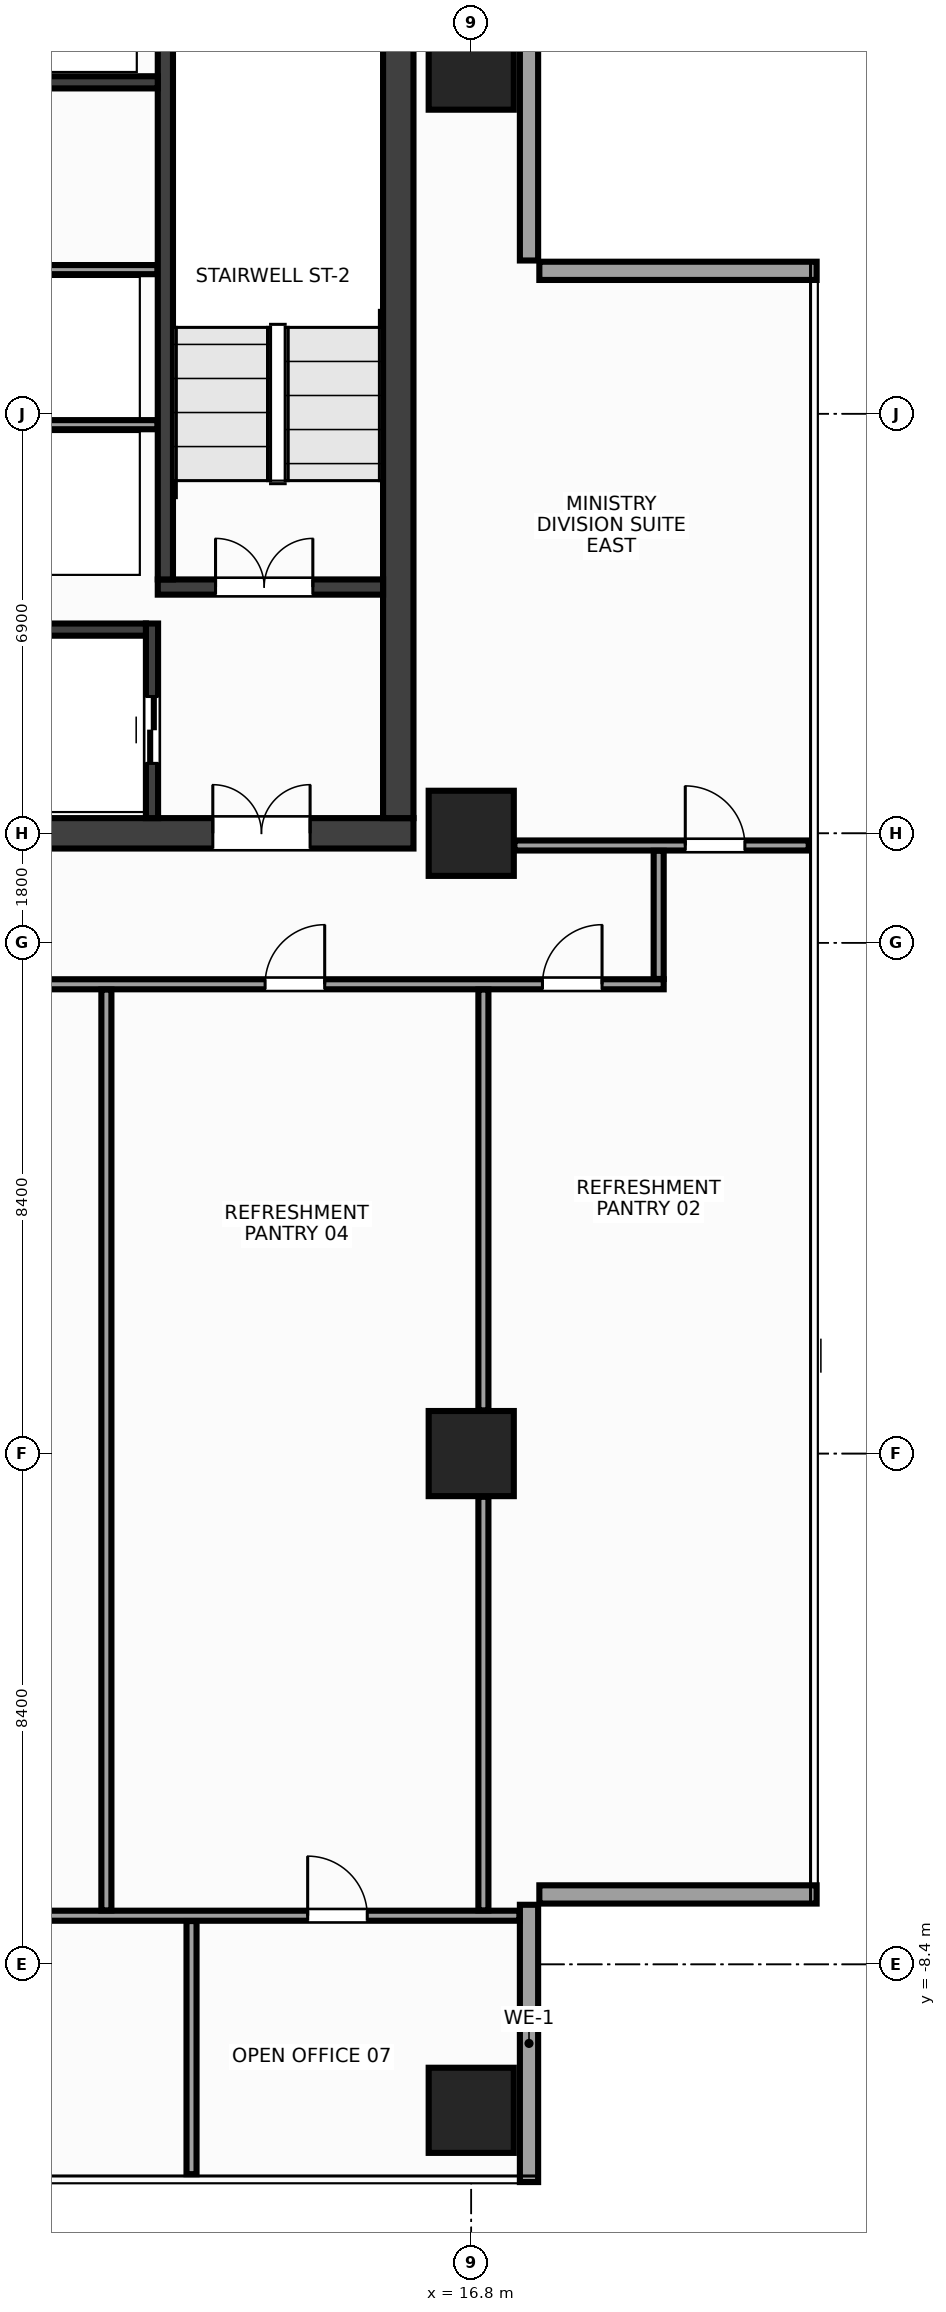
"""IFC4 building model, lengths in metres.
Left out: names, types, materials, properties, quantities, classifications, styles, units other than length and angle.
Written with IfcOpenShell. Run it as: python <this file> out.ifc"""

import sys

from ifc_helpers import new_model, si_unit, direction, frame, frame_2d, origin, origin_2d, place, context, subcontext, project, spatial, rectangle, extrude, source, transform, mapped, element, fill, save


model = new_model("IFC4")
c1 = context("Model", 3, precision=1e-05, world=origin(), true_north=direction((0.0, 1.0)))
c2 = subcontext(c1, "Body", "Model", "MODEL_VIEW")
j1 = project(units=[si_unit("LENGTHUNIT", "METRE"), si_unit("PLANEANGLEUNIT", "RADIAN")], contexts=[c1])
p1 = place(None, origin())
s1 = spatial("IfcSite", under=j1, at=p1, CompositionType="ELEMENT")
p2 = place(p1, origin())
s2 = spatial("IfcBuilding", under=s1, at=p2, CompositionType="ELEMENT")
p3 = place(p2, frame((0.0, 0.0, 257.6)))
s3 = spatial("IfcBuildingStorey", under=s2, at=p3, CompositionType="ELEMENT", Elevation=257.6)
m1 = source(origin(), c2, "Body", "SweptSolid", [
    extrude(rectangle(XDim=31.7, YDim=0.5, at=frame_2d((15.85, 0.0))), origin(), (0.0, 0.0, 1.0), 3.6),
])
p4 = place(p3, frame((-15.85, 10.2, 0.0), z_axis=(0.0, 0.0, 1.0), x_axis=(1.0, 0.0, 0.0)))
e1 = element("IfcWall", 1, at=p4, inside=s3, PredefinedType="SHEAR", context=c2, shape_type="MappedRepresentation", body=[
    mapped(m1, transform((0.0, 0.0, 0.0), x_axis=(1.0, 0.0, 0.0), y_axis=(0.0, 1.0, 0.0), z_axis=(0.0, 0.0, 1.0), scale=1.0)),
])
p5 = place(p4, frame((1.7, 0.0, 0.0)))
e2 = element("IfcOpeningElement", 2, at=p5, cuts=e1, PredefinedType="OPENING", context=c2, shape_type="SweptSolid", body=[
    extrude(rectangle(XDim=1.6, YDim=2.15, at=frame_2d((0.8, 1.075))), frame((0.0, 0.262, 0.0), z_axis=(0.0, -1.0, 0.0), x_axis=(1.0, 0.0, 0.0)), (0.0, 0.0, 1.0), 0.524),
])
p6 = place(p4, frame((28.4, 0.0, 0.0)))
e3 = element("IfcOpeningElement", 3, at=p6, cuts=e1, PredefinedType="OPENING", context=c2, shape_type="SweptSolid", body=[
    extrude(rectangle(XDim=1.6, YDim=2.15, at=frame_2d((0.8, 1.075))), frame((0.0, 0.262, 0.0), z_axis=(0.0, -1.0, 0.0), x_axis=(1.0, 0.0, 0.0)), (0.0, 0.0, 1.0), 0.524),
])
p7 = place(p4, frame((15.1, 0.0, 0.0)))
e4 = element("IfcOpeningElement", 4, at=p7, cuts=e1, PredefinedType="OPENING", context=c2, shape_type="SweptSolid", body=[
    extrude(rectangle(XDim=1.5, YDim=2.2, at=frame_2d((0.75, 1.1))), frame((0.0, 0.262, 0.0), z_axis=(0.0, -1.0, 0.0), x_axis=(1.0, 0.0, 0.0)), (0.0, 0.0, 1.0), 0.524),
])
m2 = source(origin(), c2, "Body", "SweptSolid", [
    extrude(rectangle(XDim=13.1, YDim=0.5, at=frame_2d((6.55, 0.0))), origin(), (0.0, 0.0, 1.0), 3.6),
])
p8 = place(p3, frame((15.6, 10.45, 0.0), z_axis=(0.0, 0.0, 1.0), x_axis=(0.0, 1.0, 0.0)))
e5 = element("IfcWall", 5, at=p8, inside=s3, PredefinedType="SHEAR", context=c2, shape_type="MappedRepresentation", body=[
    mapped(m2, transform((0.0, 0.0, 0.0), x_axis=(1.0, 0.0, 0.0), y_axis=(0.0, 1.0, 0.0), z_axis=(0.0, 0.0, 1.0), scale=1.0)),
])
m3 = source(origin(), c2, "Body", "SweptSolid", [
    extrude(rectangle(XDim=3.705, YDim=0.25, at=frame_2d((1.853, 0.0))), origin(), (0.0, 0.0, 1.0), 3.6),
])
p9 = place(p3, frame((11.645, 14.25, 0.0), z_axis=(0.0, 0.0, 1.0), x_axis=(1.0, 0.0, 0.0)))
e6 = element("IfcWall", 6, at=p9, inside=s3, PredefinedType="SHEAR", context=c2, shape_type="MappedRepresentation", body=[
    mapped(m3, transform((0.0, 0.0, 0.0), x_axis=(1.0, 0.0, 0.0), y_axis=(0.0, 1.0, 0.0), z_axis=(0.0, 0.0, 1.0), scale=1.0)),
])
p10 = place(p9, frame((0.95, 0.0, 0.0)))
e7 = element("IfcOpeningElement", 7, at=p10, cuts=e6, PredefinedType="OPENING", context=c2, shape_type="SweptSolid", body=[
    extrude(rectangle(XDim=1.6, YDim=2.15, at=frame_2d((0.8, 1.075))), frame((0.0, 0.137, 0.0), z_axis=(0.0, -1.0, 0.0), x_axis=(1.0, 0.0, 0.0)), (0.0, 0.0, 1.0), 0.274),
])
m4 = source(origin(), c2, "Body", "SweptSolid", [
    extrude(rectangle(XDim=9.175, YDim=0.25, at=frame_2d((4.587, 0.0))), origin(), (0.0, 0.0, 1.0), 3.6),
])
p11 = place(p3, frame((11.77, 14.375, 0.0), z_axis=(0.0, 0.0, 1.0), x_axis=(0.0, 1.0, 0.0)))
e8 = element("IfcWall", 8, at=p11, inside=s3, PredefinedType="SHEAR", context=c2, shape_type="MappedRepresentation", body=[
    mapped(m4, transform((0.0, 0.0, 0.0), x_axis=(1.0, 0.0, 0.0), y_axis=(0.0, 1.0, 0.0), z_axis=(0.0, 0.0, 1.0), scale=1.0)),
])
m5 = source(origin(), c2, "Body", "SweptSolid", [
    extrude(rectangle(XDim=3.2, YDim=0.2, at=frame_2d((1.6, 0.0))), origin(), (0.0, 0.0, 1.0), 3.6),
])
p12 = place(p3, frame((11.55, 10.45, 0.0), z_axis=(0.0, 0.0, 1.0), x_axis=(0.0, 1.0, 0.0)))
e9 = element("IfcWall", 9, at=p12, inside=s3, PredefinedType="SHEAR", context=c2, shape_type="MappedRepresentation", body=[
    mapped(m5, transform((0.0, 0.0, 0.0), x_axis=(1.0, 0.0, 0.0), y_axis=(0.0, 1.0, 0.0), z_axis=(0.0, 0.0, 1.0), scale=1.0)),
])
p13 = place(p12, frame((0.9, 0.0, 0.0)))
e10 = element("IfcOpeningElement", 10, at=p13, cuts=e9, PredefinedType="OPENING", context=c2, shape_type="SweptSolid", body=[
    extrude(rectangle(XDim=1.1, YDim=2.15, at=frame_2d((0.55, 1.075))), frame((0.0, 0.112, 0.0), z_axis=(0.0, -1.0, 0.0), x_axis=(1.0, 0.0, 0.0)), (0.0, 0.0, 1.0), 0.224),
])
m6 = source(origin(), c2, "Body", "SweptSolid", [
    extrude(rectangle(XDim=2.825, YDim=0.2, at=frame_2d((1.413, 0.0))), origin(), (0.0, 0.0, 1.0), 3.6),
])
p14 = place(p3, frame((8.625, 13.55, 0.0), z_axis=(0.0, 0.0, 1.0), x_axis=(1.0, 0.0, 0.0)))
e11 = element("IfcWall", 11, at=p14, inside=s3, PredefinedType="SHEAR", context=c2, shape_type="MappedRepresentation", body=[
    mapped(m6, transform((0.0, 0.0, 0.0), x_axis=(1.0, 0.0, 0.0), y_axis=(0.0, 1.0, 0.0), z_axis=(0.0, 0.0, 1.0), scale=1.0)),
])
m7 = source(origin(), c2, "Body", "SweptSolid", [
    extrude(rectangle(XDim=3.02, YDim=0.2, at=frame_2d((1.51, 0.0))), origin(), (0.0, 0.0, 1.0), 3.6),
])
p15 = place(p3, frame((8.625, 22.55, 0.0), z_axis=(0.0, 0.0, 1.0), x_axis=(1.0, 0.0, 0.0)))
e12 = element("IfcWall", 12, at=p15, inside=s3, PredefinedType="SHEAR", context=c2, shape_type="MappedRepresentation", body=[
    mapped(m7, transform((0.0, 0.0, 0.0), x_axis=(1.0, 0.0, 0.0), y_axis=(0.0, 1.0, 0.0), z_axis=(0.0, 0.0, 1.0), scale=1.0)),
])
m8 = source(origin(), c2, "Body", "SweptSolid", [
    extrude(rectangle(XDim=1.4, YDim=1.4, at=origin_2d()), origin(), (0.0, 0.0, 1.0), 3.6),
])
for number, where, z_axis, x_axis in (
    (13, (16.8, -10.8, 0.0), (0.0, 0.0, 1.0), (1.0, 0.0, 0.0)),
    (14, (16.8, 0.0, 0.0), (0.0, 0.0, 1.0), (1.0, 0.0, 0.0)),
    (15, (16.8, 10.2, 0.0), (0.0, 0.0, 1.0), (1.0, 0.0, 0.0)),
    (16, (16.8, 22.8, 0.0), (0.0, 0.0, 1.0), (1.0, 0.0, 0.0)),
):
    element("IfcColumn", number, at=place(p3, frame(where, z_axis=z_axis, x_axis=x_axis)), inside=s3, PredefinedType="COLUMN", context=c2, shape_type="MappedRepresentation", body=[
        mapped(m8, transform((0.0, 0.0, 0.0), x_axis=(1.0, 0.0, 0.0), y_axis=(0.0, 1.0, 0.0), z_axis=(0.0, 0.0, 1.0), scale=1.0)),
    ])
m9 = source(origin(), c2, "Body", "SweptSolid", [
    extrude(rectangle(XDim=4.56, YDim=0.3, at=frame_2d((2.28, 0.0))), origin(), (0.0, 0.0, 1.0), 2.75),
])
for number, where, z_axis, x_axis in (
    (17, (17.75, -11.98, 0.0), (0.0, 0.0, 1.0), (0.0, 1.0, 0.0)),
    (18, (17.92, -7.25, 0.0), (0.0, 0.0, 1.0), (1.0, 0.0, 0.0)),
    (19, (22.48, 19.45, 0.0), (0.0, 0.0, 1.0), (-1.0, 0.0, 0.0)),
):
    element("IfcWall", number, at=place(p3, frame(where, z_axis=z_axis, x_axis=x_axis)), inside=s3, PredefinedType="STANDARD", context=c2, shape_type="MappedRepresentation", body=[
        mapped(m9, transform((0.0, 0.0, 0.0), x_axis=(1.0, 0.0, 0.0), y_axis=(0.0, 1.0, 0.0), z_axis=(0.0, 0.0, 1.0), scale=1.0)),
    ])
m10 = source(origin(), c2, "Body", "SweptSolid", [
    extrude(rectangle(XDim=4.56, YDim=0.3, at=frame_2d((2.28, 0.0))), origin(), (0.0, 0.0, 1.0), 2.75),
])
p16 = place(p3, frame((17.75, 19.62, 0.0), z_axis=(0.0, 0.0, 1.0), x_axis=(0.0, 1.0, 0.0)))
e20 = element("IfcWall", 20, at=p16, inside=s3, PredefinedType="STANDARD", context=c2, shape_type="MappedRepresentation", body=[
    mapped(m10, transform((0.0, 0.0, 0.0), x_axis=(1.0, 0.0, 0.0), y_axis=(0.0, 1.0, 0.0), z_axis=(0.0, 0.0, 1.0), scale=1.0)),
])
m11 = source(origin(), c2, "Body", "SweptSolid", [
    extrude(rectangle(XDim=3.01, YDim=0.15, at=frame_2d((1.505, 0.0))), origin(), (0.0, 0.0, 1.0), 3.37),
])
for number, where, z_axis, x_axis in (
    (21, (8.63, 16.92, 0.0), (0.0, 0.0, 1.0), (1.0, 0.0, 0.0)),
    (22, (8.63, 19.47, 0.0), (0.0, 0.0, 1.0), (1.0, 0.0, 0.0)),
):
    element("IfcWall", number, at=place(p3, frame(where, z_axis=z_axis, x_axis=x_axis)), inside=s3, PredefinedType="PARTITIONING", context=c2, shape_type="MappedRepresentation", body=[
        mapped(m11, transform((0.0, 0.0, 0.0), x_axis=(1.0, 0.0, 0.0), y_axis=(0.0, 1.0, 0.0), z_axis=(0.0, 0.0, 1.0), scale=1.0)),
    ])
m12 = source(origin(), c2, "Body", "SweptSolid", [
    extrude(rectangle(XDim=4.84, YDim=0.165, at=frame_2d((2.42, 0.0))), origin(), (0.0, 0.0, 1.0), 3.37),
])
p17 = place(p3, frame((17.51, 10.0, 0.0), z_axis=(0.0, 0.0, 1.0), x_axis=(1.0, 0.0, 0.0)))
e23 = element("IfcWall", 23, at=p17, inside=s3, PredefinedType="PARTITIONING", context=c2, shape_type="MappedRepresentation", body=[
    mapped(m12, transform((0.0, 0.0, 0.0), x_axis=(1.0, 0.0, 0.0), y_axis=(0.0, 1.0, 0.0), z_axis=(0.0, 0.0, 1.0), scale=1.0)),
])
p18 = place(p17, frame((2.81, 0.0, 0.0)))
e24 = element("IfcOpeningElement", 24, at=p18, cuts=e23, PredefinedType="OPENING", context=c2, shape_type="SweptSolid", body=[
    extrude(rectangle(XDim=0.98, YDim=2.15, at=frame_2d((0.49, 1.075))), frame((0.0, 0.094, 0.0), z_axis=(0.0, -1.0, 0.0), x_axis=(1.0, 0.0, 0.0)), (0.0, 0.0, 1.0), 0.189),
])
m13 = source(origin(), c2, "Body", "SweptSolid", [
    extrude(rectangle(XDim=21.9, YDim=0.165, at=frame_2d((10.95, 0.0))), origin(), (0.0, 0.0, 1.0), 2.755),
])
p19 = place(p3, frame((-1.935, 7.718, 0.0), z_axis=(0.0, 0.0, 1.0), x_axis=(1.0, 0.0, 0.0)))
e25 = element("IfcWall", 25, at=p19, inside=s3, PredefinedType="PARTITIONING", context=c2, shape_type="MappedRepresentation", body=[
    mapped(m13, transform((0.0, 0.0, 0.0), x_axis=(1.0, 0.0, 0.0), y_axis=(0.0, 1.0, 0.0), z_axis=(0.0, 0.0, 1.0), scale=1.0)),
])
p20 = place(p19, frame((19.906, 0.0, 0.0)))
e26 = element("IfcOpeningElement", 26, at=p20, cuts=e25, PredefinedType="OPENING", context=c2, shape_type="SweptSolid", body=[
    extrude(rectangle(XDim=0.98, YDim=2.15, at=frame_2d((0.49, 1.075))), frame((0.0, 0.094, 0.0), z_axis=(0.0, -1.0, 0.0), x_axis=(1.0, 0.0, 0.0)), (0.0, 0.0, 1.0), 0.189),
])
p21 = place(p19, frame((15.345, 0.0, 0.0)))
e27 = element("IfcOpeningElement", 27, at=p21, cuts=e25, PredefinedType="OPENING", context=c2, shape_type="SweptSolid", body=[
    extrude(rectangle(XDim=0.98, YDim=2.15, at=frame_2d((0.49, 1.075))), frame((0.0, 0.094, 0.0), z_axis=(0.0, -1.0, 0.0), x_axis=(1.0, 0.0, 0.0)), (0.0, 0.0, 1.0), 0.189),
])
m14 = source(origin(), c2, "Body", "SweptSolid", [
    extrude(rectangle(XDim=2.108, YDim=0.165, at=frame_2d((1.054, 0.0))), origin(), (0.0, 0.0, 1.0), 3.37),
])
p22 = place(p3, frame((19.883, 7.805, 0.0), z_axis=(0.0, 0.0, 1.0), x_axis=(0.0, 1.0, 0.0)))
e28 = element("IfcWall", 28, at=p22, inside=s3, PredefinedType="PARTITIONING", context=c2, shape_type="MappedRepresentation", body=[
    mapped(m14, transform((0.0, 0.0, 0.0), x_axis=(1.0, 0.0, 0.0), y_axis=(0.0, 1.0, 0.0), z_axis=(0.0, 0.0, 1.0), scale=1.0)),
])
m15 = source(origin(), c2, "Body", "SweptSolid", [
    extrude(rectangle(XDim=35.184, YDim=0.165, at=frame_2d((17.592, 0.0))), origin(), (0.0, 0.0, 1.0), 2.755),
])
p23 = place(p3, frame((-17.592, -7.6, 0.0), z_axis=(0.0, 0.0, 1.0), x_axis=(1.0, 0.0, 0.0)))
e29 = element("IfcWall", 29, at=p23, inside=s3, PredefinedType="PARTITIONING", context=c2, shape_type="MappedRepresentation", body=[
    mapped(m15, transform((0.0, 0.0, 0.0), x_axis=(1.0, 0.0, 0.0), y_axis=(0.0, 1.0, 0.0), z_axis=(0.0, 0.0, 1.0), scale=1.0)),
])
p24 = place(p23, frame((2.402, 0.0, 0.0)))
e30 = element("IfcOpeningElement", 30, at=p24, cuts=e29, PredefinedType="OPENING", context=c2, shape_type="SweptSolid", body=[
    extrude(rectangle(XDim=0.98, YDim=2.15, at=frame_2d((0.49, 1.075))), frame((0.0, 0.094, 0.0), z_axis=(0.0, -1.0, 0.0), x_axis=(1.0, 0.0, 0.0)), (0.0, 0.0, 1.0), 0.189),
])
p25 = place(p23, frame((31.702, 0.0, 0.0)))
e31 = element("IfcOpeningElement", 31, at=p25, cuts=e29, PredefinedType="OPENING", context=c2, shape_type="SweptSolid", body=[
    extrude(rectangle(XDim=0.98, YDim=2.15, at=frame_2d((0.49, 1.075))), frame((0.0, 0.094, 0.0), z_axis=(0.0, -1.0, 0.0), x_axis=(1.0, 0.0, 0.0)), (0.0, 0.0, 1.0), 0.189),
])
p26 = place(p23, frame((9.102, 0.0, 0.0)))
e32 = element("IfcOpeningElement", 32, at=p26, cuts=e29, PredefinedType="OPENING", context=c2, shape_type="SweptSolid", body=[
    extrude(rectangle(XDim=0.98, YDim=2.15, at=frame_2d((0.49, 1.075))), frame((0.0, 0.094, 0.0), z_axis=(0.0, -1.0, 0.0), x_axis=(1.0, 0.0, 0.0)), (0.0, 0.0, 1.0), 0.189),
])
p27 = place(p23, frame((16.302, 0.0, 0.0)))
e33 = element("IfcOpeningElement", 33, at=p27, cuts=e29, PredefinedType="OPENING", context=c2, shape_type="SweptSolid", body=[
    extrude(rectangle(XDim=0.98, YDim=2.15, at=frame_2d((0.49, 1.075))), frame((0.0, 0.094, 0.0), z_axis=(0.0, -1.0, 0.0), x_axis=(1.0, 0.0, 0.0)), (0.0, 0.0, 1.0), 0.189),
])
p28 = place(p23, frame((24.302, 0.0, 0.0)))
e34 = element("IfcOpeningElement", 34, at=p28, cuts=e29, PredefinedType="OPENING", context=c2, shape_type="SweptSolid", body=[
    extrude(rectangle(XDim=0.98, YDim=2.15, at=frame_2d((0.49, 1.075))), frame((0.0, 0.094, 0.0), z_axis=(0.0, -1.0, 0.0), x_axis=(1.0, 0.0, 0.0)), (0.0, 0.0, 1.0), 0.189),
])
m16 = source(origin(), c2, "Body", "SweptSolid", [
    extrude(rectangle(XDim=15.142, YDim=0.165, at=frame_2d((7.571, 0.0))), origin(), (0.0, 0.0, 1.0), 2.655),
])
p29 = place(p3, frame((10.8, -7.512, 0.0), z_axis=(0.0, 0.0, 1.0), x_axis=(0.0, 1.0, 0.0)))
e35 = element("IfcWall", 35, at=p29, inside=s3, PredefinedType="PARTITIONING", context=c2, shape_type="MappedRepresentation", body=[
    mapped(m16, transform((0.0, 0.0, 0.0), x_axis=(1.0, 0.0, 0.0), y_axis=(0.0, 1.0, 0.0), z_axis=(0.0, 0.0, 1.0), scale=1.0)),
])
m17 = source(origin(), c2, "Body", "SweptSolid", [
    extrude(rectangle(XDim=6.802, YDim=0.165, at=frame_2d((3.401, 0.0))), origin(), (0.0, 0.0, 1.0), 2.755),
])
p30 = place(p3, frame((17.0, -7.512, 0.0), z_axis=(0.0, 0.0, 1.0), x_axis=(0.0, 1.0, 0.0)))
e36 = element("IfcWall", 36, at=p30, inside=s3, PredefinedType="PARTITIONING", context=c2, shape_type="MappedRepresentation", body=[
    mapped(m17, transform((0.0, 0.0, 0.0), x_axis=(1.0, 0.0, 0.0), y_axis=(0.0, 1.0, 0.0), z_axis=(0.0, 0.0, 1.0), scale=1.0)),
])
m18 = source(origin(), c2, "Body", "SweptSolid", [
    extrude(rectangle(XDim=6.92, YDim=0.165, at=frame_2d((3.46, 0.0))), origin(), (0.0, 0.0, 1.0), 2.755),
])
p31 = place(p3, frame((17.0, 0.71, 0.0), z_axis=(0.0, 0.0, 1.0), x_axis=(0.0, 1.0, 0.0)))
e37 = element("IfcWall", 37, at=p31, inside=s3, PredefinedType="PARTITIONING", context=c2, shape_type="MappedRepresentation", body=[
    mapped(m18, transform((0.0, 0.0, 0.0), x_axis=(1.0, 0.0, 0.0), y_axis=(0.0, 1.0, 0.0), z_axis=(0.0, 0.0, 1.0), scale=1.0)),
])
m19 = source(origin(), c2, "Body", "SweptSolid", [
    extrude(rectangle(XDim=4.163, YDim=0.165, at=frame_2d((2.081, 0.0))), origin(), (0.0, 0.0, 1.0), 2.905),
])
p32 = place(p3, frame((12.2, -11.85, 0.0), z_axis=(0.0, 0.0, 1.0), x_axis=(0.0, 1.0, 0.0)))
e38 = element("IfcWall", 38, at=p32, inside=s3, PredefinedType="PARTITIONING", context=c2, shape_type="MappedRepresentation", body=[
    mapped(m19, transform((0.0, 0.0, 0.0), x_axis=(1.0, 0.0, 0.0), y_axis=(0.0, 1.0, 0.0), z_axis=(0.0, 0.0, 1.0), scale=1.0)),
])
m20 = source(origin(), c2, "Body", "SweptSolid", [
    extrude(rectangle(XDim=1.6, YDim=2.15, at=frame_2d((0.8, 1.075))), frame((0.0, 0.025, 0.0), z_axis=(0.0, -1.0, 0.0), x_axis=(1.0, 0.0, 0.0)), (0.0, 0.0, 1.0), 0.05),
])
p33 = place(p10, origin())
e39 = element("IfcDoor", 39, at=p33, inside=s3, OperationType="DOUBLE_DOOR_SINGLE_SWING", PredefinedType="DOOR", context=c2, shape_type="MappedRepresentation", body=[
    mapped(m20, transform((0.0, 0.0, 0.0), x_axis=(1.0, 0.0, 0.0), y_axis=(0.0, 1.0, 0.0), z_axis=(0.0, 0.0, 1.0), scale=1.0)),
])
fill(e7, e39)
p34 = place(p6, origin())
e40 = element("IfcDoor", 40, at=p34, inside=s3, OperationType="DOUBLE_DOOR_SINGLE_SWING", PredefinedType="DOOR", context=c2, shape_type="MappedRepresentation", body=[
    mapped(m20, transform((0.0, 0.0, 0.0), x_axis=(1.0, 0.0, 0.0), y_axis=(0.0, 1.0, 0.0), z_axis=(0.0, 0.0, 1.0), scale=1.0)),
])
fill(e3, e40)
m21 = source(origin(), c2, "Body", "SweptSolid", [
    extrude(rectangle(XDim=1.1, YDim=2.15, at=frame_2d((0.55, 1.075))), frame((0.0, 0.025, 0.0), z_axis=(0.0, -1.0, 0.0), x_axis=(1.0, 0.0, 0.0)), (0.0, 0.0, 1.0), 0.05),
])
p35 = place(p13, origin())
e41 = element("IfcDoor", 41, at=p35, inside=s3, OperationType="DOUBLE_DOOR_SLIDING", PredefinedType="DOOR", context=c2, shape_type="MappedRepresentation", body=[
    mapped(m21, transform((0.0, 0.0, 0.0), x_axis=(1.0, 0.0, 0.0), y_axis=(0.0, 1.0, 0.0), z_axis=(0.0, 0.0, 1.0), scale=1.0)),
])
fill(e10, e41)
m22 = source(origin(), c2, "Body", "SweptSolid", [
    extrude(rectangle(XDim=0.98, YDim=2.15, at=frame_2d((0.49, 1.075))), frame((0.0, 0.025, 0.0), z_axis=(0.0, -1.0, 0.0), x_axis=(1.0, 0.0, 0.0)), (0.0, 0.0, 1.0), 0.05),
])
p36 = place(p20, origin())
e42 = element("IfcDoor", 42, at=p36, inside=s3, OperationType="SINGLE_SWING_RIGHT", PredefinedType="DOOR", context=c2, shape_type="MappedRepresentation", body=[
    mapped(m22, transform((0.0, 0.0, 0.0), x_axis=(1.0, 0.0, 0.0), y_axis=(0.0, 1.0, 0.0), z_axis=(0.0, 0.0, 1.0), scale=1.0)),
])
fill(e26, e42)
p37 = place(p21, origin())
e43 = element("IfcDoor", 43, at=p37, inside=s3, OperationType="SINGLE_SWING_RIGHT", PredefinedType="DOOR", context=c2, shape_type="MappedRepresentation", body=[
    mapped(m22, transform((0.0, 0.0, 0.0), x_axis=(1.0, 0.0, 0.0), y_axis=(0.0, 1.0, 0.0), z_axis=(0.0, 0.0, 1.0), scale=1.0)),
])
fill(e27, e43)
p38 = place(p18, origin())
e44 = element("IfcDoor", 44, at=p38, inside=s3, OperationType="SINGLE_SWING_LEFT", PredefinedType="DOOR", context=c2, shape_type="MappedRepresentation", body=[
    mapped(m22, transform((0.0, 0.0, 0.0), x_axis=(1.0, 0.0, 0.0), y_axis=(0.0, 1.0, 0.0), z_axis=(0.0, 0.0, 1.0), scale=1.0)),
])
fill(e24, e44)
p39 = place(p25, origin())
e45 = element("IfcDoor", 45, at=p39, inside=s3, OperationType="SINGLE_SWING_LEFT", PredefinedType="DOOR", context=c2, shape_type="MappedRepresentation", body=[
    mapped(m22, transform((0.0, 0.0, 0.0), x_axis=(1.0, 0.0, 0.0), y_axis=(0.0, 1.0, 0.0), z_axis=(0.0, 0.0, 1.0), scale=1.0)),
])
fill(e31, e45)
save(model, sys.argv[1])
